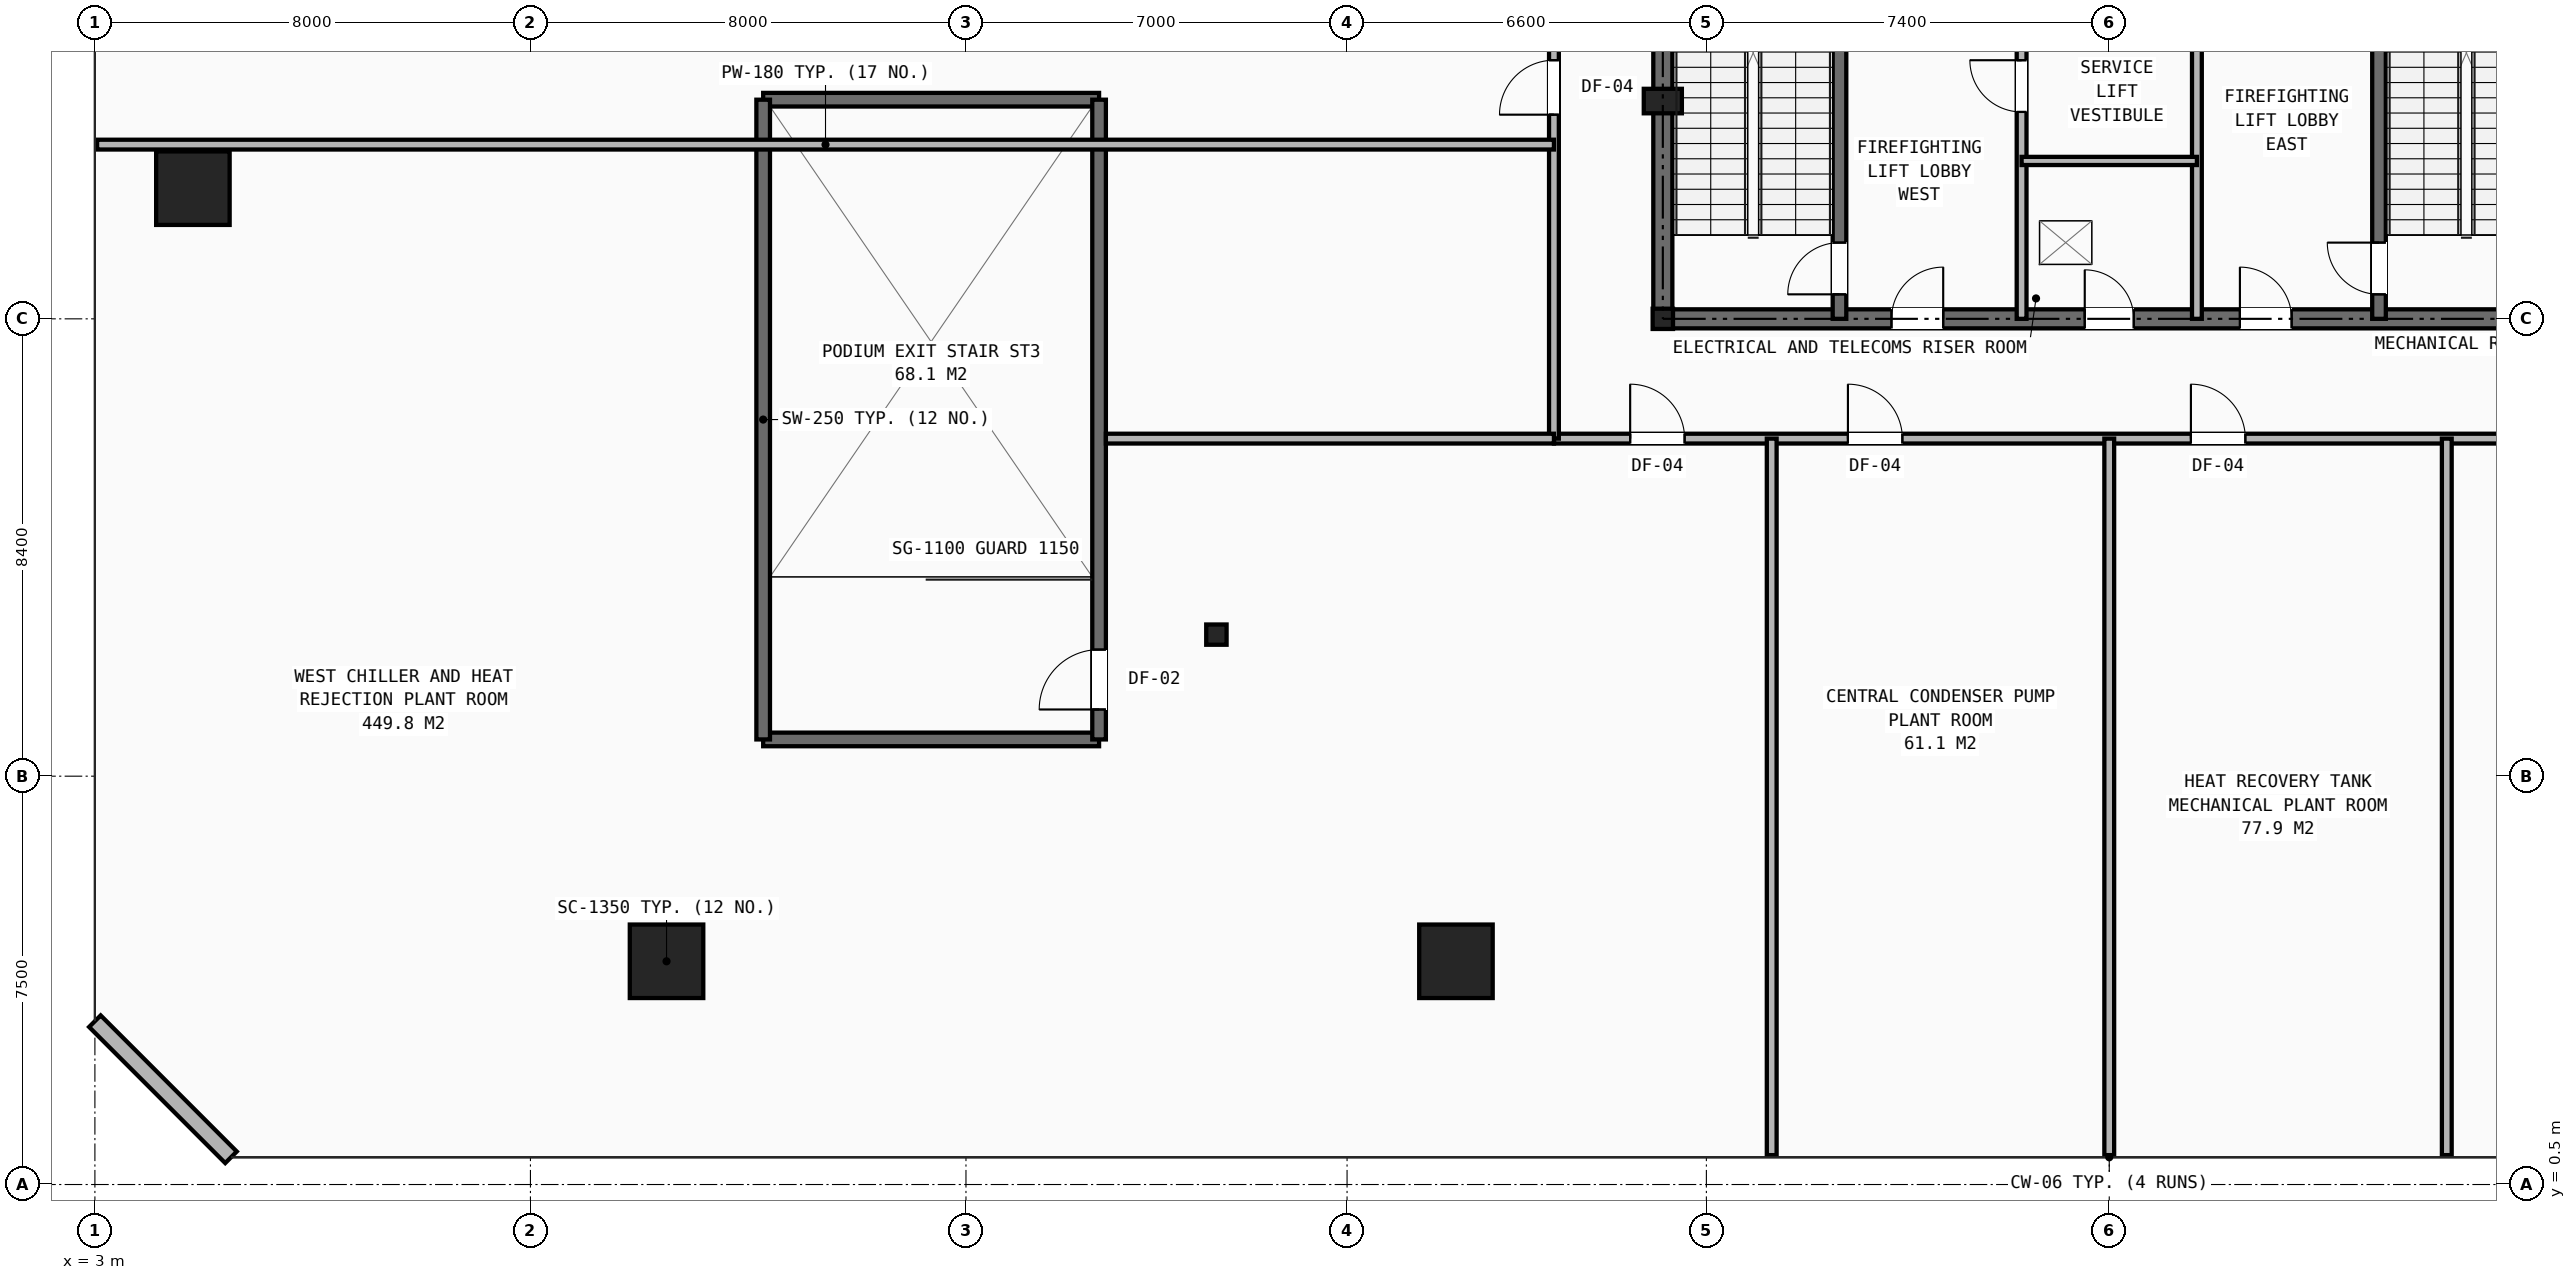
"""IFC4 building model, lengths in metres.
Left out: names, types, materials, properties, quantities, classifications, styles, units other than length and angle.
Written with IfcOpenShell. Run it as: python <this file> out.ifc"""

import sys

from ifc_helpers import new_model, si_unit, direction, frame, frame_2d, origin, origin_2d, place, context, subcontext, project, spatial, rectangle, hollow_rectangle, i_section, extrude, element, fill, save


model = new_model("IFC4")
c1 = context("Model", 3, precision=1e-05, world=origin(), true_north=direction((0.0, 1.0)))
c2 = subcontext(c1, "Body", "Model", "MODEL_VIEW")
j1 = project(units=[si_unit("LENGTHUNIT", "METRE"), si_unit("PLANEANGLEUNIT", "RADIAN")], contexts=[c1])
p1 = place(None, origin())
s1 = spatial("IfcSite", under=j1, at=p1, CompositionType="ELEMENT")
p2 = place(p1, origin())
s2 = spatial("IfcBuilding", under=s1, at=p2, CompositionType="ELEMENT")
p3 = place(p2, frame((0.0, 0.0, 22.0)))
s3 = spatial("IfcBuildingStorey", under=s2, at=p3, CompositionType="ELEMENT", Elevation=22.0)
for number, where, z_axis, x_axis in (
    (1, (31.8, 16.4, 0.0), (0.0, 0.0, 1.0), (1.0, 0.0, 0.0)),
    (2, (23.6, 10.6, 0.0), (0.0, 0.0, 1.0), (1.0, 0.0, 0.0)),
):
    element("IfcColumn", number, at=place(p3, frame(where, z_axis=z_axis, x_axis=x_axis)), inside=s3, PredefinedType="COLUMN", context=c2, shape_type="SweptSolid", body=[
        extrude(i_section(OverallWidth=0.374, OverallDepth=0.372, WebThickness=0.016, FlangeThickness=0.026, at=origin_2d()), origin(), (0.0, 0.0, 1.0), 5.2),
    ])
p4 = place(p3, frame((31.8, 20.4, 0.0), z_axis=(0.0, 0.0, 1.0), x_axis=(1.0, 0.0, 0.0)))
e3 = element("IfcColumn", 3, at=p4, inside=s3, PredefinedType="PILASTER", context=c2, shape_type="SweptSolid", body=[
    extrude(rectangle(XDim=0.7, YDim=0.45, at=origin_2d()), origin(), (0.0, 0.0, 1.0), 5.2),
])
for number, where, z_axis, x_axis in (
    (4, (13.5, 4.6, 0.0), (0.0, 0.0, 1.0), (1.0, 0.0, 0.0)),
    (5, (28.0, 4.6, 0.0), (0.0, 0.0, 1.0), (1.0, 0.0, 0.0)),
    (6, (4.8, 18.8, 0.0), (0.0, 0.0, 1.0), (1.0, 0.0, 0.0)),
):
    element("IfcColumn", number, at=place(p3, frame(where, z_axis=z_axis, x_axis=x_axis)), inside=s3, PredefinedType="COLUMN", context=c2, shape_type="SweptSolid", body=[
        extrude(hollow_rectangle(XDim=1.35, YDim=1.35, WallThickness=0.085, at=origin_2d()), origin(), (0.0, 0.0, 1.0), 5.2),
    ])
p5 = place(p3, frame((3.0, 3.5, 0.0), z_axis=(0.0, 0.0, 1.0), x_axis=(0.707106781187, -0.707106781187, 0.0)))
e7 = element("IfcWall", 7, at=p5, inside=s3, PredefinedType="STANDARD", context=c2, shape_type="SweptSolid", body=[
    extrude(rectangle(XDim=3.536, YDim=0.3, at=frame_2d((1.768, 0.0))), origin(), (0.0, 0.0, 1.0), 4.78),
])
p6 = place(p3, frame((31.8, 16.4, 0.0), z_axis=(0.0, 0.0, 1.0), x_axis=(1.0, 0.0, 0.0)))
e8 = element("IfcWall", 8, at=p6, inside=s3, PredefinedType="SHEAR", context=c2, shape_type="SweptSolid", body=[
    extrude(rectangle(XDim=16.4, YDim=0.35, at=frame_2d((8.2, 0.0))), origin(), (0.0, 0.0, 1.0), 4.78),
])
p7 = place(p6, frame((7.75, 0.0, 0.0)))
e9 = element("IfcOpeningElement", 9, at=p7, cuts=e8, PredefinedType="OPENING", context=c2, shape_type="SweptSolid", body=[
    extrude(rectangle(XDim=0.9, YDim=2.1, at=frame_2d((0.45, 1.05))), frame((0.0, 0.185, 0.0), z_axis=(0.0, -1.0, 0.0), x_axis=(1.0, 0.0, 0.0)), (0.0, 0.0, 1.0), 0.37),
])
p8 = place(p6, frame((4.2, 0.0, 0.0)))
e10 = element("IfcOpeningElement", 10, at=p8, cuts=e8, PredefinedType="OPENING", context=c2, shape_type="SweptSolid", body=[
    extrude(rectangle(XDim=0.95, YDim=2.1, at=frame_2d((0.475, 1.05))), frame((0.0, 0.185, 0.0), z_axis=(0.0, -1.0, 0.0), x_axis=(1.0, 0.0, 0.0)), (0.0, 0.0, 1.0), 0.37),
])
p9 = place(p6, frame((10.6, 0.0, 0.0)))
e11 = element("IfcOpeningElement", 11, at=p9, cuts=e8, PredefinedType="OPENING", context=c2, shape_type="SweptSolid", body=[
    extrude(rectangle(XDim=0.95, YDim=2.1, at=frame_2d((0.475, 1.05))), frame((0.0, 0.185, 0.0), z_axis=(0.0, -1.0, 0.0), x_axis=(1.0, 0.0, 0.0)), (0.0, 0.0, 1.0), 0.37),
])
p10 = place(p3, frame((31.8, 16.4, 0.0), z_axis=(0.0, 0.0, 1.0), x_axis=(0.0, 1.0, 0.0)))
e12 = element("IfcWall", 12, at=p10, inside=s3, PredefinedType="SHEAR", context=c2, shape_type="SweptSolid", body=[
    extrude(rectangle(XDim=14.8, YDim=0.35, at=frame_2d((7.4, 0.0))), origin(), (0.0, 0.0, 1.0), 4.78),
])
p11 = place(p10, frame((11.0, 0.0, 0.0)))
e13 = element("IfcOpeningElement", 13, at=p11, cuts=e12, PredefinedType="OPENING", context=c2, shape_type="SweptSolid", body=[
    extrude(rectangle(XDim=1.1, YDim=2.15, at=frame_2d((0.55, 1.075))), frame((0.0, 0.185, 0.0), z_axis=(0.0, -1.0, 0.0), x_axis=(1.0, 0.0, 0.0)), (0.0, 0.0, 1.0), 0.37),
])
p12 = place(p3, frame((35.045, 16.4, 0.0), z_axis=(0.0, 0.0, 1.0), x_axis=(0.0, 1.0, 0.0)))
e14 = element("IfcWall", 14, at=p12, inside=s3, PredefinedType="SHEAR", context=c2, shape_type="SweptSolid", body=[
    extrude(rectangle(XDim=8.4, YDim=0.25, at=frame_2d((4.2, 0.0))), origin(), (0.0, 0.0, 1.0), 4.78),
])
p13 = place(p12, frame((0.45, 0.0, 0.0)))
e15 = element("IfcOpeningElement", 15, at=p13, cuts=e14, PredefinedType="OPENING", context=c2, shape_type="SweptSolid", body=[
    extrude(rectangle(XDim=0.95, YDim=2.1, at=frame_2d((0.475, 1.05))), frame((0.0, 0.135, 0.0), z_axis=(0.0, -1.0, 0.0), x_axis=(1.0, 0.0, 0.0)), (0.0, 0.0, 1.0), 0.27),
])
p14 = place(p3, frame((44.955, 16.4, 0.0), z_axis=(0.0, 0.0, 1.0), x_axis=(0.0, 1.0, 0.0)))
e16 = element("IfcWall", 16, at=p14, inside=s3, PredefinedType="SHEAR", context=c2, shape_type="SweptSolid", body=[
    extrude(rectangle(XDim=8.4, YDim=0.25, at=frame_2d((4.2, 0.0))), origin(), (0.0, 0.0, 1.0), 4.78),
])
p15 = place(p14, frame((0.45, 0.0, 0.0)))
e17 = element("IfcOpeningElement", 17, at=p15, cuts=e16, PredefinedType="OPENING", context=c2, shape_type="SweptSolid", body=[
    extrude(rectangle(XDim=0.95, YDim=2.1, at=frame_2d((0.475, 1.05))), frame((0.0, 0.135, 0.0), z_axis=(0.0, -1.0, 0.0), x_axis=(1.0, 0.0, 0.0)), (0.0, 0.0, 1.0), 0.27),
])
p16 = place(p3, frame((38.39, 16.4, 0.0), z_axis=(0.0, 0.0, 1.0), x_axis=(0.0, 1.0, 0.0)))
e18 = element("IfcWall", 18, at=p16, inside=s3, PredefinedType="PARTITIONING", context=c2, shape_type="SweptSolid", body=[
    extrude(rectangle(XDim=8.4, YDim=0.18, at=frame_2d((4.2, 0.0))), origin(), (0.0, 0.0, 1.0), 2.52),
])
p17 = place(p16, frame((3.8, 0.0, 0.0)))
e19 = element("IfcOpeningElement", 19, at=p17, cuts=e18, PredefinedType="OPENING", context=c2, shape_type="SweptSolid", body=[
    extrude(rectangle(XDim=0.95, YDim=2.1, at=frame_2d((0.475, 1.05))), frame((0.0, 0.1, 0.0), z_axis=(0.0, -1.0, 0.0), x_axis=(1.0, 0.0, 0.0)), (0.0, 0.0, 1.0), 0.2),
])
p18 = place(p3, frame((41.61, 16.4, 0.0), z_axis=(0.0, 0.0, 1.0), x_axis=(0.0, 1.0, 0.0)))
e20 = element("IfcWall", 20, at=p18, inside=s3, PredefinedType="PARTITIONING", context=c2, shape_type="SweptSolid", body=[
    extrude(rectangle(XDim=8.4, YDim=0.18, at=frame_2d((4.2, 0.0))), origin(), (0.0, 0.0, 1.0), 2.52),
])
p19 = place(p3, frame((38.39, 19.3, 0.0), z_axis=(0.0, 0.0, 1.0), x_axis=(1.0, 0.0, 0.0)))
e21 = element("IfcWall", 21, at=p19, inside=s3, PredefinedType="PARTITIONING", context=c2, shape_type="SweptSolid", body=[
    extrude(rectangle(XDim=3.22, YDim=0.15, at=frame_2d((1.61, 0.0))), origin(), (0.0, 0.0, 1.0), 4.78),
])
for number, where, z_axis, x_axis in (
    (22, (15.275, 20.425, 0.0), (0.0, 0.0, 1.0), (1.0, 0.0, 0.0)),
    (23, (15.275, 8.675, 0.0), (0.0, 0.0, 1.0), (1.0, 0.0, 0.0)),
):
    element("IfcWall", number, at=place(p3, frame(where, z_axis=z_axis, x_axis=x_axis)), inside=s3, PredefinedType="SHEAR", context=c2, shape_type="SweptSolid", body=[
        extrude(rectangle(XDim=6.17, YDim=0.25, at=frame_2d((3.085, 0.0))), origin(), (0.0, 0.0, 1.0), 4.78),
    ])
p20 = place(p3, frame((15.275, 8.675, 0.0), z_axis=(0.0, 0.0, 1.0), x_axis=(0.0, 1.0, 0.0)))
e24 = element("IfcWall", 24, at=p20, inside=s3, PredefinedType="SHEAR", context=c2, shape_type="SweptSolid", body=[
    extrude(rectangle(XDim=11.75, YDim=0.25, at=frame_2d((5.875, 0.0))), origin(), (0.0, 0.0, 1.0), 4.78),
])
p21 = place(p3, frame((21.445, 8.675, 0.0), z_axis=(0.0, 0.0, 1.0), x_axis=(0.0, 1.0, 0.0)))
e25 = element("IfcWall", 25, at=p21, inside=s3, PredefinedType="SHEAR", context=c2, shape_type="SweptSolid", body=[
    extrude(rectangle(XDim=11.75, YDim=0.25, at=frame_2d((5.875, 0.0))), origin(), (0.0, 0.0, 1.0), 4.78),
])
p22 = place(p21, frame((0.55, 0.0, 0.0)))
e26 = element("IfcOpeningElement", 26, at=p22, cuts=e25, PredefinedType="OPENING", context=c2, shape_type="SweptSolid", body=[
    extrude(rectangle(XDim=1.1, YDim=2.15, at=frame_2d((0.55, 1.075))), frame((0.0, 0.135, 0.0), z_axis=(0.0, -1.0, 0.0), x_axis=(1.0, 0.0, 0.0)), (0.0, 0.0, 1.0), 0.27),
])
p23 = place(p3, frame((29.8, 14.2, 0.0), z_axis=(0.0, 0.0, 1.0), x_axis=(1.0, 0.0, 0.0)))
e27 = element("IfcWall", 27, at=p23, inside=s3, PredefinedType="PARTITIONING", context=c2, shape_type="SweptSolid", body=[
    extrude(rectangle(XDim=20.4, YDim=0.18, at=frame_2d((10.2, 0.0))), origin(), (0.0, 0.0, 1.0), 2.52),
])
p24 = place(p23, frame((1.4, 0.0, 0.0)))
e28 = element("IfcOpeningElement", 28, at=p24, cuts=e27, PredefinedType="OPENING", context=c2, shape_type="SweptSolid", body=[
    extrude(rectangle(XDim=1.0, YDim=2.15, at=frame_2d((0.5, 1.075))), frame((0.0, 0.1, 0.0), z_axis=(0.0, -1.0, 0.0), x_axis=(1.0, 0.0, 0.0)), (0.0, 0.0, 1.0), 0.2),
])
p25 = place(p23, frame((5.4, 0.0, 0.0)))
e29 = element("IfcOpeningElement", 29, at=p25, cuts=e27, PredefinedType="OPENING", context=c2, shape_type="SweptSolid", body=[
    extrude(rectangle(XDim=1.0, YDim=2.15, at=frame_2d((0.5, 1.075))), frame((0.0, 0.1, 0.0), z_axis=(0.0, -1.0, 0.0), x_axis=(1.0, 0.0, 0.0)), (0.0, 0.0, 1.0), 0.2),
])
p26 = place(p23, frame((11.7, 0.0, 0.0)))
e30 = element("IfcOpeningElement", 30, at=p26, cuts=e27, PredefinedType="OPENING", context=c2, shape_type="SweptSolid", body=[
    extrude(rectangle(XDim=1.0, YDim=2.15, at=frame_2d((0.5, 1.075))), frame((0.0, 0.1, 0.0), z_axis=(0.0, -1.0, 0.0), x_axis=(1.0, 0.0, 0.0)), (0.0, 0.0, 1.0), 0.2),
])
p27 = place(p23, frame((17.4, 0.0, 0.0)))
e31 = element("IfcOpeningElement", 31, at=p27, cuts=e27, PredefinedType="OPENING", context=c2, shape_type="SweptSolid", body=[
    extrude(rectangle(XDim=1.0, YDim=2.15, at=frame_2d((0.5, 1.075))), frame((0.0, 0.1, 0.0), z_axis=(0.0, -1.0, 0.0), x_axis=(1.0, 0.0, 0.0)), (0.0, 0.0, 1.0), 0.2),
])
p28 = place(p3, frame((29.8, 14.2, 0.0), z_axis=(0.0, 0.0, 1.0), x_axis=(0.0, 1.0, 0.0)))
e32 = element("IfcWall", 32, at=p28, inside=s3, PredefinedType="PARTITIONING", context=c2, shape_type="SweptSolid", body=[
    extrude(rectangle(XDim=18.8, YDim=0.18, at=frame_2d((9.4, 0.0))), origin(), (0.0, 0.0, 1.0), 2.52),
])
p29 = place(p28, frame((5.95, 0.0, 0.0)))
e33 = element("IfcOpeningElement", 33, at=p29, cuts=e32, PredefinedType="OPENING", context=c2, shape_type="SweptSolid", body=[
    extrude(rectangle(XDim=1.0, YDim=2.15, at=frame_2d((0.5, 1.075))), frame((0.0, 0.1, 0.0), z_axis=(0.0, -1.0, 0.0), x_axis=(1.0, 0.0, 0.0)), (0.0, 0.0, 1.0), 0.2),
])
p30 = place(p3, frame((3.04, 19.6, 0.0), z_axis=(0.0, 0.0, 1.0), x_axis=(1.0, 0.0, 0.0)))
e34 = element("IfcWall", 34, at=p30, inside=s3, PredefinedType="PARTITIONING", context=c2, shape_type="SweptSolid", body=[
    extrude(rectangle(XDim=26.76, YDim=0.18, at=frame_2d((13.38, 0.0))), origin(), (0.0, 0.0, 1.0), 2.52),
])
for number, where, z_axis, x_axis in (
    (35, (33.8, 1.04, 0.0), (0.0, 0.0, 1.0), (0.0, 1.0, 0.0)),
    (36, (40.0, 1.04, 0.0), (0.0, 0.0, 1.0), (0.0, 1.0, 0.0)),
    (37, (46.2, 1.04, 0.0), (0.0, 0.0, 1.0), (0.0, 1.0, 0.0)),
):
    element("IfcWall", number, at=place(p3, frame(where, z_axis=z_axis, x_axis=x_axis)), inside=s3, PredefinedType="PARTITIONING", context=c2, shape_type="SweptSolid", body=[
        extrude(rectangle(XDim=13.16, YDim=0.18, at=frame_2d((6.58, 0.0))), origin(), (0.0, 0.0, 1.0), 2.52),
    ])
p31 = place(p3, frame((21.57, 14.2, 0.0), z_axis=(0.0, 0.0, 1.0), x_axis=(1.0, 0.0, 0.0)))
e38 = element("IfcWall", 38, at=p31, inside=s3, PredefinedType="PARTITIONING", context=c2, shape_type="SweptSolid", body=[
    extrude(rectangle(XDim=8.23, YDim=0.18, at=frame_2d((4.115, 0.0))), origin(), (0.0, 0.0, 1.0), 2.52),
])
p32 = place(p7, origin())
e39 = element("IfcDoor", 39, at=p32, inside=s3, OperationType="SINGLE_SWING_LEFT", PredefinedType="DOOR", context=c2, shape_type="SweptSolid", body=[
    extrude(rectangle(XDim=0.9, YDim=2.1, at=frame_2d((0.45, 1.05))), frame((0.0, 0.025, 0.0), z_axis=(0.0, -1.0, 0.0), x_axis=(1.0, 0.0, 0.0)), (0.0, 0.0, 1.0), 0.05),
])
fill(e9, e39)
p33 = place(p17, origin())
e40 = element("IfcDoor", 40, at=p33, inside=s3, OperationType="SINGLE_SWING_RIGHT", PredefinedType="DOOR", context=c2, shape_type="SweptSolid", body=[
    extrude(rectangle(XDim=0.95, YDim=2.1, at=frame_2d((0.475, 1.05))), frame((0.0, 0.025, 0.0), z_axis=(0.0, -1.0, 0.0), x_axis=(1.0, 0.0, 0.0)), (0.0, 0.0, 1.0), 0.05),
])
fill(e19, e40)
p34 = place(p13, origin())
e41 = element("IfcDoor", 41, at=p34, inside=s3, OperationType="SINGLE_SWING_LEFT", PredefinedType="DOOR", context=c2, shape_type="SweptSolid", body=[
    extrude(rectangle(XDim=0.95, YDim=2.1, at=frame_2d((0.475, 1.05))), frame((0.0, 0.025, 0.0), z_axis=(0.0, -1.0, 0.0), x_axis=(1.0, 0.0, 0.0)), (0.0, 0.0, 1.0), 0.05),
])
fill(e15, e41)
p35 = place(p15, origin())
e42 = element("IfcDoor", 42, at=p35, inside=s3, OperationType="SINGLE_SWING_RIGHT", PredefinedType="DOOR", context=c2, shape_type="SweptSolid", body=[
    extrude(rectangle(XDim=0.95, YDim=2.1, at=frame_2d((0.475, 1.05))), frame((0.0, 0.025, 0.0), z_axis=(0.0, -1.0, 0.0), x_axis=(1.0, 0.0, 0.0)), (0.0, 0.0, 1.0), 0.05),
])
fill(e17, e42)
p36 = place(p8, origin())
e43 = element("IfcDoor", 43, at=p36, inside=s3, OperationType="SINGLE_SWING_RIGHT", PredefinedType="DOOR", context=c2, shape_type="SweptSolid", body=[
    extrude(rectangle(XDim=0.95, YDim=2.1, at=frame_2d((0.475, 1.05))), frame((0.0, 0.025, 0.0), z_axis=(0.0, -1.0, 0.0), x_axis=(1.0, 0.0, 0.0)), (0.0, 0.0, 1.0), 0.05),
])
fill(e10, e43)
p37 = place(p9, origin())
e44 = element("IfcDoor", 44, at=p37, inside=s3, OperationType="SINGLE_SWING_LEFT", PredefinedType="DOOR", context=c2, shape_type="SweptSolid", body=[
    extrude(rectangle(XDim=0.95, YDim=2.1, at=frame_2d((0.475, 1.05))), frame((0.0, 0.025, 0.0), z_axis=(0.0, -1.0, 0.0), x_axis=(1.0, 0.0, 0.0)), (0.0, 0.0, 1.0), 0.05),
])
fill(e11, e44)
p38 = place(p24, origin())
e45 = element("IfcDoor", 45, at=p38, inside=s3, OperationType="SINGLE_SWING_LEFT", PredefinedType="DOOR", context=c2, shape_type="SweptSolid", body=[
    extrude(rectangle(XDim=1.0, YDim=2.15, at=frame_2d((0.5, 1.075))), frame((0.0, 0.025, 0.0), z_axis=(0.0, -1.0, 0.0), x_axis=(1.0, 0.0, 0.0)), (0.0, 0.0, 1.0), 0.05),
])
fill(e28, e45)
p39 = place(p25, origin())
e46 = element("IfcDoor", 46, at=p39, inside=s3, OperationType="SINGLE_SWING_LEFT", PredefinedType="DOOR", context=c2, shape_type="SweptSolid", body=[
    extrude(rectangle(XDim=1.0, YDim=2.15, at=frame_2d((0.5, 1.075))), frame((0.0, 0.025, 0.0), z_axis=(0.0, -1.0, 0.0), x_axis=(1.0, 0.0, 0.0)), (0.0, 0.0, 1.0), 0.05),
])
fill(e29, e46)
p40 = place(p26, origin())
e47 = element("IfcDoor", 47, at=p40, inside=s3, OperationType="SINGLE_SWING_LEFT", PredefinedType="DOOR", context=c2, shape_type="SweptSolid", body=[
    extrude(rectangle(XDim=1.0, YDim=2.15, at=frame_2d((0.5, 1.075))), frame((0.0, 0.025, 0.0), z_axis=(0.0, -1.0, 0.0), x_axis=(1.0, 0.0, 0.0)), (0.0, 0.0, 1.0), 0.05),
])
fill(e30, e47)
p41 = place(p29, origin())
e48 = element("IfcDoor", 48, at=p41, inside=s3, OperationType="SINGLE_SWING_LEFT", PredefinedType="DOOR", context=c2, shape_type="SweptSolid", body=[
    extrude(rectangle(XDim=1.0, YDim=2.15, at=frame_2d((0.5, 1.075))), frame((0.0, 0.025, 0.0), z_axis=(0.0, -1.0, 0.0), x_axis=(1.0, 0.0, 0.0)), (0.0, 0.0, 1.0), 0.05),
])
fill(e33, e48)
p42 = place(p22, origin())
e49 = element("IfcDoor", 49, at=p42, inside=s3, OperationType="SINGLE_SWING_LEFT", PredefinedType="DOOR", context=c2, shape_type="SweptSolid", body=[
    extrude(rectangle(XDim=1.1, YDim=2.15, at=frame_2d((0.55, 1.075))), frame((0.0, 0.025, 0.0), z_axis=(0.0, -1.0, 0.0), x_axis=(1.0, 0.0, 0.0)), (0.0, 0.0, 1.0), 0.05),
])
fill(e26, e49)
save(model, sys.argv[1])
